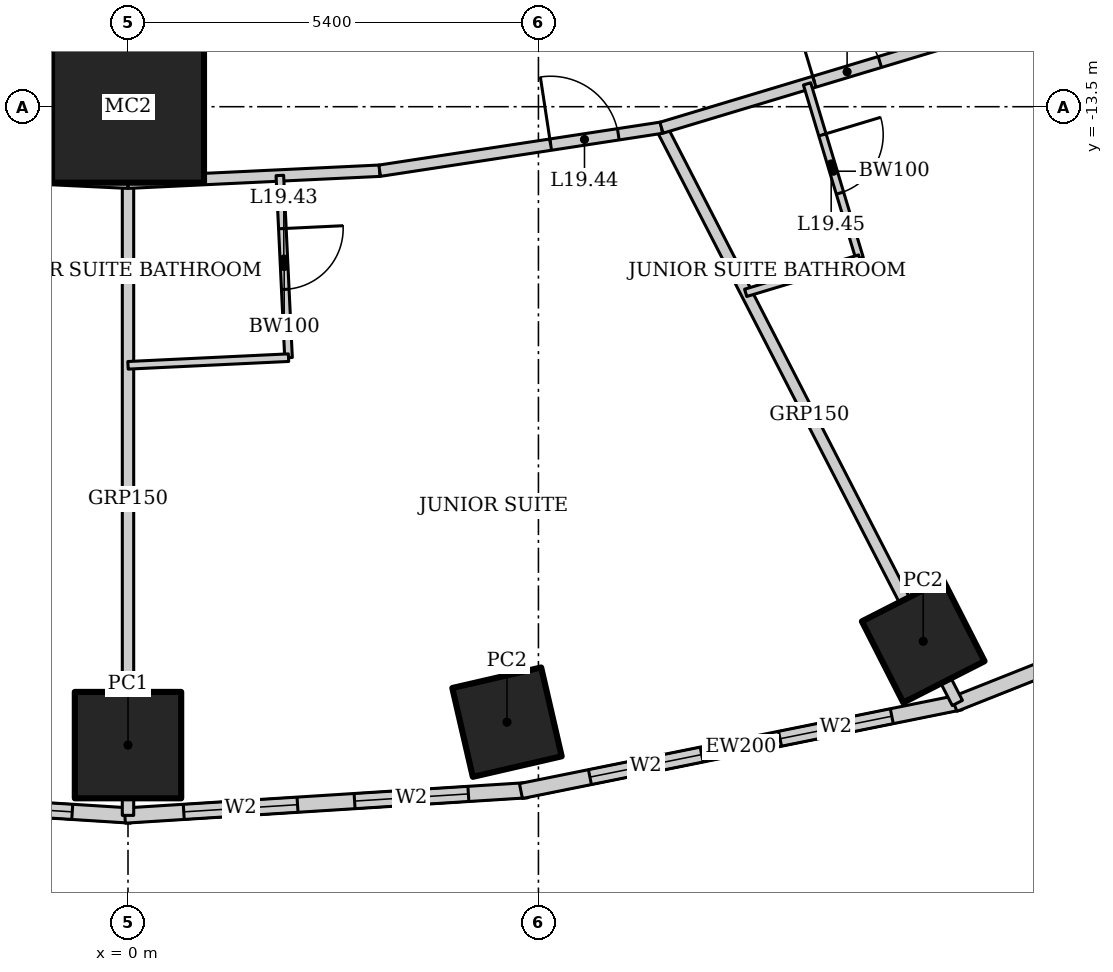
"""IFC4 building model, lengths in metres.
Left out: names, types, materials, properties, quantities, classifications, styles, units other than length and angle.
Written with IfcOpenShell. Run it as: python <this file> out.ifc"""

import sys

from ifc_helpers import new_model, si_unit, direction, frame, frame_2d, origin, origin_2d, place, context, subcontext, project, spatial, rectangle, hollow_rectangle, extrude, element, fill, save


model = new_model("IFC4")
c1 = context("Model", 3, precision=1e-05, world=origin(), true_north=direction((0.0, 1.0)))
c2 = subcontext(c1, "Body", "Model", "MODEL_VIEW")
j1 = project(units=[si_unit("LENGTHUNIT", "METRE"), si_unit("PLANEANGLEUNIT", "RADIAN")], contexts=[c1])
p1 = place(None, origin())
s1 = spatial("IfcSite", under=j1, at=p1, CompositionType="ELEMENT")
p2 = place(p1, origin())
s2 = spatial("IfcBuilding", under=s1, at=p2, CompositionType="ELEMENT")
p3 = place(p2, frame((0.0, 0.0, 83.8)))
s3 = spatial("IfcBuildingStorey", under=s2, at=p3, CompositionType="ELEMENT", Elevation=83.8)
p4 = place(p3, frame((0.0, -13.5, 0.0), z_axis=(0.0, 0.0, 1.0), x_axis=(1.0, 0.0, 0.0)))
e1 = element("IfcColumn", 1, at=p4, inside=s3, PredefinedType="COLUMN", context=c2, shape_type="SweptSolid", body=[
    extrude(hollow_rectangle(XDim=2.0, YDim=2.0, WallThickness=0.17, at=origin_2d()), origin(), (0.0, 0.0, 1.0), 3.6),
])
p5 = place(p3, frame((0.0, -21.9, 0.0), z_axis=(0.0, 0.0, 1.0), x_axis=(1.0, 0.0, 0.0)))
e2 = element("IfcColumn", 2, at=p5, inside=s3, PredefinedType="COLUMN", context=c2, shape_type="SweptSolid", body=[
    extrude(hollow_rectangle(XDim=1.4, YDim=1.4, WallThickness=0.1, at=origin_2d()), origin(), (0.0, 0.0, 1.0), 3.6),
])
for number, where, z_axis, x_axis in (
    (3, (4.986, -21.598, 0.0), (0.0, 0.0, 1.0), (0.974, 0.225, 0.0)),
    (4, (10.463, -20.534, 0.0), (0.0, 0.0, 1.0), (0.891, 0.454, 0.0)),
):
    element("IfcColumn", number, at=place(p3, frame(where, z_axis=z_axis, x_axis=x_axis)), inside=s3, PredefinedType="COLUMN", context=c2, shape_type="SweptSolid", body=[
        extrude(hollow_rectangle(XDim=1.2, YDim=1.2, WallThickness=0.1, at=origin_2d()), origin(), (0.0, 0.0, 1.0), 3.6),
    ])
p6 = place(p3, frame((-5.253, -22.493, 0.0), z_axis=(0.0, 0.0, 1.0), x_axis=(0.998018582375, -0.062919863585, 0.0)))
e5 = element("IfcWall", 5, at=p6, inside=s3, PredefinedType="SOLIDWALL", context=c2, shape_type="SweptSolid", body=[
    extrude(rectangle(XDim=5.304, YDim=0.2, at=frame_2d((2.652, 0.0))), origin(), (0.0, 0.0, 1.0), 3.45),
])
p7 = place(p6, frame((0.776, 0.0, 0.5)))
e6 = element("IfcOpeningElement", 6, at=p7, cuts=e5, PredefinedType="OPENING", context=c2, shape_type="SweptSolid", body=[
    extrude(rectangle(XDim=1.5, YDim=2.2, at=frame_2d((0.75, 1.1))), frame((0.0, 0.11, 0.0), z_axis=(0.0, -1.0, 0.0), x_axis=(1.0, 0.0, 0.0)), (0.0, 0.0, 1.0), 0.22),
])
p8 = place(p6, frame((3.028, 0.0, 0.5)))
e7 = element("IfcOpeningElement", 7, at=p8, cuts=e5, PredefinedType="OPENING", context=c2, shape_type="SweptSolid", body=[
    extrude(rectangle(XDim=1.5, YDim=2.2, at=frame_2d((0.75, 1.1))), frame((0.0, 0.11, 0.0), z_axis=(0.0, -1.0, 0.0), x_axis=(1.0, 0.0, 0.0)), (0.0, 0.0, 1.0), 0.22),
])
p9 = place(p3, frame((-0.041, -22.827, 0.0), z_axis=(0.0, 0.0, 1.0), x_axis=(0.998018582375, 0.062919863585, 0.0)))
e8 = element("IfcWall", 8, at=p9, inside=s3, PredefinedType="SOLIDWALL", context=c2, shape_type="SweptSolid", body=[
    extrude(rectangle(XDim=5.304, YDim=0.2, at=frame_2d((2.652, 0.0))), origin(), (0.0, 0.0, 1.0), 3.45),
])
p10 = place(p9, frame((0.776, 0.0, 0.5)))
e9 = element("IfcOpeningElement", 9, at=p10, cuts=e8, PredefinedType="OPENING", context=c2, shape_type="SweptSolid", body=[
    extrude(rectangle(XDim=1.5, YDim=2.2, at=frame_2d((0.75, 1.1))), frame((0.0, 0.11, 0.0), z_axis=(0.0, -1.0, 0.0), x_axis=(1.0, 0.0, 0.0)), (0.0, 0.0, 1.0), 0.22),
])
p11 = place(p9, frame((3.028, 0.0, 0.5)))
e10 = element("IfcOpeningElement", 10, at=p11, cuts=e8, PredefinedType="OPENING", context=c2, shape_type="SweptSolid", body=[
    extrude(rectangle(XDim=1.5, YDim=2.2, at=frame_2d((0.75, 1.1))), frame((0.0, 0.11, 0.0), z_axis=(0.0, -1.0, 0.0), x_axis=(1.0, 0.0, 0.0)), (0.0, 0.0, 1.0), 0.22),
])
p12 = place(p3, frame((5.17, -22.504, 0.0), z_axis=(0.0, 0.0, 1.0), x_axis=(0.980251657452, 0.197754110105, 0.0)))
e11 = element("IfcWall", 11, at=p12, inside=s3, PredefinedType="SOLIDWALL", context=c2, shape_type="SweptSolid", body=[
    extrude(rectangle(XDim=5.904, YDim=0.2, at=frame_2d((2.952, 0.0))), origin(), (0.0, 0.0, 1.0), 3.45),
])
p13 = place(p12, frame((0.926, 0.0, 0.5)))
e12 = element("IfcOpeningElement", 12, at=p13, cuts=e11, PredefinedType="OPENING", context=c2, shape_type="SweptSolid", body=[
    extrude(rectangle(XDim=1.5, YDim=2.2, at=frame_2d((0.75, 1.1))), frame((0.0, 0.11, 0.0), z_axis=(0.0, -1.0, 0.0), x_axis=(1.0, 0.0, 0.0)), (0.0, 0.0, 1.0), 0.22),
])
p14 = place(p12, frame((3.478, 0.0, 0.5)))
e13 = element("IfcOpeningElement", 13, at=p14, cuts=e11, PredefinedType="OPENING", context=c2, shape_type="SweptSolid", body=[
    extrude(rectangle(XDim=1.5, YDim=2.2, at=frame_2d((0.75, 1.1))), frame((0.0, 0.11, 0.0), z_axis=(0.0, -1.0, 0.0), x_axis=(1.0, 0.0, 0.0)), (0.0, 0.0, 1.0), 0.22),
])
p15 = place(p3, frame((10.869, -21.363, 0.0), z_axis=(0.0, 0.0, 1.0), x_axis=(0.929358351251, 0.369178892895, 0.0)))
e14 = element("IfcWall", 14, at=p15, inside=s3, PredefinedType="SOLIDWALL", context=c2, shape_type="SweptSolid", body=[
    extrude(rectangle(XDim=7.692, YDim=0.2, at=frame_2d((3.846, 0.0))), origin(), (0.0, 0.0, 1.0), 3.45),
])
p16 = place(p15, frame((1.373, 0.0, 0.5)))
e15 = element("IfcOpeningElement", 15, at=p16, cuts=e14, PredefinedType="OPENING", context=c2, shape_type="SweptSolid", body=[
    extrude(rectangle(XDim=1.5, YDim=2.2, at=frame_2d((0.75, 1.1))), frame((0.0, 0.11, 0.0), z_axis=(0.0, -1.0, 0.0), x_axis=(1.0, 0.0, 0.0)), (0.0, 0.0, 1.0), 0.22),
])
p17 = place(p15, frame((4.819, 0.0, 0.5)))
e16 = element("IfcOpeningElement", 16, at=p17, cuts=e14, PredefinedType="OPENING", context=c2, shape_type="SweptSolid", body=[
    extrude(rectangle(XDim=1.5, YDim=2.2, at=frame_2d((0.75, 1.1))), frame((0.0, 0.11, 0.0), z_axis=(0.0, -1.0, 0.0), x_axis=(1.0, 0.0, 0.0)), (0.0, 0.0, 1.0), 0.22),
])
p18 = place(p3, frame((0.0, -22.825, 0.0), z_axis=(0.0, 0.0, 1.0), x_axis=(0.0, 1.0, 0.0)))
e17 = element("IfcWall", 17, at=p18, inside=s3, PredefinedType="PARTITIONING", context=c2, shape_type="SweptSolid", body=[
    extrude(rectangle(XDim=8.325, YDim=0.15, at=frame_2d((4.162, 0.0))), origin(), (0.0, 0.0, 1.0), 2.924),
])
p19 = place(p3, frame((10.912, -21.346, 0.0), z_axis=(0.0, 0.0, 1.0), x_axis=(-0.457327273085, 0.889298468059, 0.0)))
e18 = element("IfcWall", 18, at=p19, inside=s3, PredefinedType="PARTITIONING", context=c2, shape_type="SweptSolid", body=[
    extrude(rectangle(XDim=8.511, YDim=0.15, at=frame_2d((4.256, 0.0))), origin(), (0.0, 0.0, 1.0), 2.528),
])
p20 = place(p3, frame((-3.311, -14.342, 0.0), z_axis=(0.0, 0.0, 1.0), x_axis=(0.998863968075, -0.047652631422, 0.0)))
e19 = element("IfcWall", 19, at=p20, inside=s3, PredefinedType="PARTITIONING", context=c2, shape_type="SweptSolid", body=[
    extrude(rectangle(XDim=3.315, YDim=0.15, at=frame_2d((1.657, 0.0))), origin(), (0.0, 0.0, 1.0), 3.45),
])
p21 = place(p20, frame((0.15, 0.0, 0.0)))
e20 = element("IfcOpeningElement", 20, at=p21, cuts=e19, PredefinedType="OPENING", context=c2, shape_type="SweptSolid", body=[
    extrude(rectangle(XDim=0.9, YDim=2.1, at=frame_2d((0.45, 1.05))), frame((0.0, 0.085, 0.0), z_axis=(0.0, -1.0, 0.0), x_axis=(1.0, 0.0, 0.0)), (0.0, 0.0, 1.0), 0.17),
])
p22 = place(p3, frame((0.0, -14.5, 0.0), z_axis=(0.0, 0.0, 1.0), x_axis=(0.998863968075, 0.047652631422, 0.0)))
e21 = element("IfcWall", 21, at=p22, inside=s3, PredefinedType="PARTITIONING", context=c2, shape_type="SweptSolid", body=[
    extrude(rectangle(XDim=3.315, YDim=0.15, at=frame_2d((1.657, 0.0))), origin(), (0.0, 0.0, 1.0), 3.45),
])
p23 = place(p3, frame((3.311, -14.342, 0.0), z_axis=(0.0, 0.0, 1.0), x_axis=(0.988564270062, 0.150800145746, 0.0)))
e22 = element("IfcWall", 22, at=p23, inside=s3, PredefinedType="PARTITIONING", context=c2, shape_type="SweptSolid", body=[
    extrude(rectangle(XDim=3.751, YDim=0.15, at=frame_2d((1.875, 0.0))), origin(), (0.0, 0.0, 1.0), 3.45),
])
p24 = place(p23, frame((2.276, 0.0, 0.0)))
e23 = element("IfcOpeningElement", 23, at=p24, cuts=e22, PredefinedType="OPENING", context=c2, shape_type="SweptSolid", body=[
    extrude(rectangle(XDim=0.9, YDim=2.1, at=frame_2d((0.45, 1.05))), frame((0.0, 0.085, 0.0), z_axis=(0.0, -1.0, 0.0), x_axis=(1.0, 0.0, 0.0)), (0.0, 0.0, 1.0), 0.17),
])
p25 = place(p3, frame((7.019, -13.776, 0.0), z_axis=(0.0, 0.0, 1.0), x_axis=(0.957564241242, 0.288219922793, 0.0)))
e24 = element("IfcWall", 24, at=p25, inside=s3, PredefinedType="PARTITIONING", context=c2, shape_type="SweptSolid", body=[
    extrude(rectangle(XDim=5.085, YDim=0.15, at=frame_2d((2.542, 0.0))), origin(), (0.0, 0.0, 1.0), 3.45),
])
p26 = place(p25, frame((2.1, 0.0, 0.0)))
e25 = element("IfcOpeningElement", 25, at=p26, cuts=e24, PredefinedType="OPENING", context=c2, shape_type="SweptSolid", body=[
    extrude(rectangle(XDim=0.9, YDim=2.1, at=frame_2d((0.45, 1.05))), frame((0.0, 0.085, 0.0), z_axis=(0.0, -1.0, 0.0), x_axis=(1.0, 0.0, 0.0)), (0.0, 0.0, 1.0), 0.17),
])
p27 = place(p3, frame((1.998, -14.405, 0.0), z_axis=(0.0, 0.0, 1.0), x_axis=(0.047608648396, -0.998866065395, 0.0)))
e26 = element("IfcWall", 26, at=p27, inside=s3, PredefinedType="PARTITIONING", context=c2, shape_type="SweptSolid", body=[
    extrude(rectangle(XDim=2.4, YDim=0.1, at=frame_2d((1.2, 0.0))), origin(), (0.0, 0.0, 1.0), 2.749),
])
p28 = place(p27, frame((0.7, 0.0, 0.0)))
e27 = element("IfcOpeningElement", 27, at=p28, cuts=e26, PredefinedType="OPENING", context=c2, shape_type="SweptSolid", body=[
    extrude(rectangle(XDim=0.8, YDim=2.1, at=frame_2d((0.4, 1.05))), frame((0.0, 0.06, 0.0), z_axis=(0.0, -1.0, 0.0), x_axis=(1.0, 0.0, 0.0)), (0.0, 0.0, 1.0), 0.12),
])
p29 = place(p3, frame((2.112, -16.802, 0.0), z_axis=(0.0, 0.0, 1.0), x_axis=(-0.998862383453, -0.047685835668, 0.0)))
e28 = element("IfcWall", 28, at=p29, inside=s3, PredefinedType="PARTITIONING", context=c2, shape_type="SweptSolid", body=[
    extrude(rectangle(XDim=2.115, YDim=0.1, at=frame_2d((1.057, 0.0))), origin(), (0.0, 0.0, 1.0), 3.45),
])
p30 = place(p3, frame((8.935, -13.2, 0.0), z_axis=(0.0, 0.0, 1.0), x_axis=(0.288197066254, -0.957571120598, 0.0)))
e29 = element("IfcWall", 29, at=p30, inside=s3, PredefinedType="PARTITIONING", context=c2, shape_type="SweptSolid", body=[
    extrude(rectangle(XDim=2.4, YDim=0.1, at=frame_2d((1.2, 0.0))), origin(), (0.0, 0.0, 1.0), 3.45),
])
p31 = place(p30, frame((0.7, 0.0, 0.0)))
e30 = element("IfcOpeningElement", 30, at=p31, cuts=e29, PredefinedType="OPENING", context=c2, shape_type="SweptSolid", body=[
    extrude(rectangle(XDim=0.8, YDim=2.1, at=frame_2d((0.4, 1.05))), frame((0.0, 0.06, 0.0), z_axis=(0.0, -1.0, 0.0), x_axis=(1.0, 0.0, 0.0)), (0.0, 0.0, 1.0), 0.12),
])
p32 = place(p3, frame((9.626, -15.498, 0.0), z_axis=(0.0, 0.0, 1.0), x_axis=(-0.957551231109, -0.288263143328, 0.0)))
e31 = element("IfcWall", 31, at=p32, inside=s3, PredefinedType="PARTITIONING", context=c2, shape_type="SweptSolid", body=[
    extrude(rectangle(XDim=1.566, YDim=0.1, at=frame_2d((0.783, 0.0))), origin(), (0.0, 0.0, 1.0), 3.45),
])
p33 = place(p8, origin())
e32 = element("IfcWindow", 32, at=p33, inside=s3, PartitioningType="SINGLE_PANEL", PredefinedType="WINDOW", context=c2, shape_type="SweptSolid", body=[
    extrude(rectangle(XDim=1.5, YDim=2.2, at=frame_2d((0.75, 1.1))), frame((0.0, 0.03, 0.0), z_axis=(0.0, -1.0, 0.0), x_axis=(1.0, 0.0, 0.0)), (0.0, 0.0, 1.0), 0.06),
])
fill(e7, e32)
p34 = place(p10, origin())
e33 = element("IfcWindow", 33, at=p34, inside=s3, PartitioningType="SINGLE_PANEL", PredefinedType="WINDOW", context=c2, shape_type="SweptSolid", body=[
    extrude(rectangle(XDim=1.5, YDim=2.2, at=frame_2d((0.75, 1.1))), frame((0.0, 0.03, 0.0), z_axis=(0.0, -1.0, 0.0), x_axis=(1.0, 0.0, 0.0)), (0.0, 0.0, 1.0), 0.06),
])
fill(e9, e33)
p35 = place(p11, origin())
e34 = element("IfcWindow", 34, at=p35, inside=s3, PartitioningType="SINGLE_PANEL", PredefinedType="WINDOW", context=c2, shape_type="SweptSolid", body=[
    extrude(rectangle(XDim=1.5, YDim=2.2, at=frame_2d((0.75, 1.1))), frame((0.0, 0.03, 0.0), z_axis=(0.0, -1.0, 0.0), x_axis=(1.0, 0.0, 0.0)), (0.0, 0.0, 1.0), 0.06),
])
fill(e10, e34)
p36 = place(p13, origin())
e35 = element("IfcWindow", 35, at=p36, inside=s3, PartitioningType="SINGLE_PANEL", PredefinedType="WINDOW", context=c2, shape_type="SweptSolid", body=[
    extrude(rectangle(XDim=1.5, YDim=2.2, at=frame_2d((0.75, 1.1))), frame((0.0, 0.03, 0.0), z_axis=(0.0, -1.0, 0.0), x_axis=(1.0, 0.0, 0.0)), (0.0, 0.0, 1.0), 0.06),
])
fill(e12, e35)
p37 = place(p14, origin())
e36 = element("IfcWindow", 36, at=p37, inside=s3, PartitioningType="SINGLE_PANEL", PredefinedType="WINDOW", context=c2, shape_type="SweptSolid", body=[
    extrude(rectangle(XDim=1.5, YDim=2.2, at=frame_2d((0.75, 1.1))), frame((0.0, 0.03, 0.0), z_axis=(0.0, -1.0, 0.0), x_axis=(1.0, 0.0, 0.0)), (0.0, 0.0, 1.0), 0.06),
])
fill(e13, e36)
p38 = place(p28, origin())
e37 = element("IfcDoor", 37, at=p38, inside=s3, OperationType="SINGLE_SWING_LEFT", PredefinedType="DOOR", context=c2, shape_type="SweptSolid", body=[
    extrude(rectangle(XDim=0.8, YDim=2.1, at=frame_2d((0.4, 1.05))), frame((0.0, 0.025, 0.0), z_axis=(0.0, -1.0, 0.0), x_axis=(1.0, 0.0, 0.0)), (0.0, 0.0, 1.0), 0.05),
])
fill(e27, e37)
p39 = place(p24, origin())
e38 = element("IfcDoor", 38, at=p39, inside=s3, OperationType="SINGLE_SWING_LEFT", PredefinedType="DOOR", context=c2, shape_type="SweptSolid", body=[
    extrude(rectangle(XDim=0.9, YDim=2.1, at=frame_2d((0.45, 1.05))), frame((0.0, 0.025, 0.0), z_axis=(0.0, -1.0, 0.0), x_axis=(1.0, 0.0, 0.0)), (0.0, 0.0, 1.0), 0.05),
])
fill(e23, e38)
p40 = place(p31, origin())
e39 = element("IfcDoor", 39, at=p40, inside=s3, OperationType="SINGLE_SWING_LEFT", PredefinedType="DOOR", context=c2, shape_type="SweptSolid", body=[
    extrude(rectangle(XDim=0.8, YDim=2.1, at=frame_2d((0.4, 1.05))), frame((0.0, 0.025, 0.0), z_axis=(0.0, -1.0, 0.0), x_axis=(1.0, 0.0, 0.0)), (0.0, 0.0, 1.0), 0.05),
])
fill(e30, e39)
p41 = place(p26, origin())
e40 = element("IfcDoor", 40, at=p41, inside=s3, OperationType="SINGLE_SWING_LEFT", PredefinedType="DOOR", context=c2, shape_type="SweptSolid", body=[
    extrude(rectangle(XDim=0.9, YDim=2.1, at=frame_2d((0.45, 1.05))), frame((0.0, 0.025, 0.0), z_axis=(0.0, -1.0, 0.0), x_axis=(1.0, 0.0, 0.0)), (0.0, 0.0, 1.0), 0.05),
])
fill(e25, e40)
save(model, sys.argv[1])
